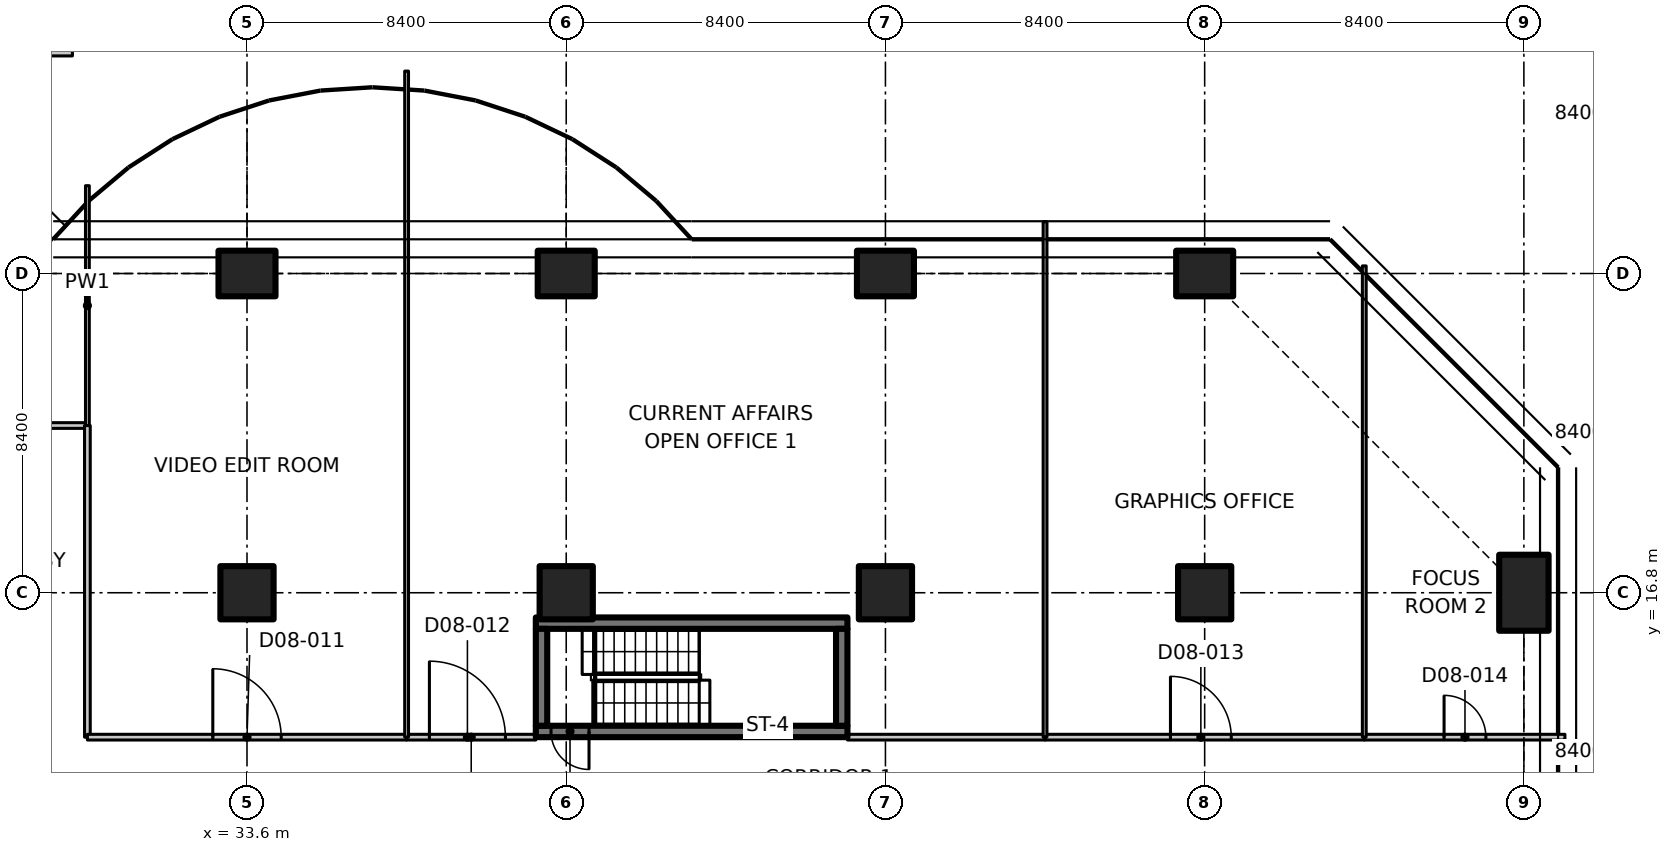
"""IFC4 building model, lengths in metres.
Left out: names, types, materials, properties, quantities, classifications, styles, units other than length and angle.
Written with IfcOpenShell. Run it as: python <this file> out.ifc"""

import sys

from ifc_helpers import new_model, si_unit, direction, frame, frame_2d, origin, origin_2d, place, context, subcontext, project, spatial, polyline, rectangle, outline, extrude, element, fill, save


model = new_model("IFC4")
c1 = context("Model", 3, precision=1e-05, world=origin(), true_north=direction((0.0, 1.0)))
c2 = subcontext(c1, "Body", "Model", "MODEL_VIEW")
j1 = project(units=[si_unit("LENGTHUNIT", "METRE"), si_unit("PLANEANGLEUNIT", "RADIAN")], contexts=[c1])
p1 = place(None, origin())
s1 = spatial("IfcSite", under=j1, at=p1, CompositionType="ELEMENT")
p2 = place(p1, origin())
s2 = spatial("IfcBuilding", under=s1, at=p2, CompositionType="ELEMENT")
p3 = place(p2, frame((0.0, 0.0, 54.5)))
s3 = spatial("IfcBuildingStorey", under=s2, at=p3, CompositionType="ELEMENT", Elevation=54.5)
p4 = place(p3, frame((33.6, 16.8, 0.0), z_axis=(0.0, 0.0, 1.0), x_axis=(1.0, 0.0, 0.0)))
e1 = element("IfcColumn", 1, at=p4, inside=s3, PredefinedType="COLUMN", context=c2, shape_type="SweptSolid", body=[
    extrude(rectangle(XDim=1.4, YDim=1.4, at=origin_2d()), origin(), (0.0, 0.0, 1.0), 3.35),
])
p5 = place(p3, frame((33.6, 25.2, 0.0), z_axis=(0.0, 0.0, 1.0), x_axis=(0.0, 1.0, 0.0)))
e2 = element("IfcColumn", 2, at=p5, inside=s3, PredefinedType="COLUMN", context=c2, shape_type="SweptSolid", body=[
    extrude(rectangle(XDim=1.2, YDim=1.5, at=origin_2d()), origin(), (0.0, 0.0, 1.0), 3.35),
])
p6 = place(p3, frame((42.0, 16.8, 0.0), z_axis=(0.0, 0.0, 1.0), x_axis=(1.0, 0.0, 0.0)))
e3 = element("IfcColumn", 3, at=p6, inside=s3, PredefinedType="COLUMN", context=c2, shape_type="SweptSolid", body=[
    extrude(rectangle(XDim=1.4, YDim=1.4, at=origin_2d()), origin(), (0.0, 0.0, 1.0), 3.35),
])
p7 = place(p3, frame((42.0, 25.2, 0.0), z_axis=(0.0, 0.0, 1.0), x_axis=(0.0, 1.0, 0.0)))
e4 = element("IfcColumn", 4, at=p7, inside=s3, PredefinedType="COLUMN", context=c2, shape_type="SweptSolid", body=[
    extrude(rectangle(XDim=1.2, YDim=1.5, at=origin_2d()), origin(), (0.0, 0.0, 1.0), 3.35),
])
p8 = place(p3, frame((50.4, 16.8, 0.0), z_axis=(0.0, 0.0, 1.0), x_axis=(1.0, 0.0, 0.0)))
e5 = element("IfcColumn", 5, at=p8, inside=s3, PredefinedType="COLUMN", context=c2, shape_type="SweptSolid", body=[
    extrude(rectangle(XDim=1.4, YDim=1.4, at=origin_2d()), origin(), (0.0, 0.0, 1.0), 3.35),
])
p9 = place(p3, frame((50.4, 25.2, 0.0), z_axis=(0.0, 0.0, 1.0), x_axis=(0.0, 1.0, 0.0)))
e6 = element("IfcColumn", 6, at=p9, inside=s3, PredefinedType="COLUMN", context=c2, shape_type="SweptSolid", body=[
    extrude(rectangle(XDim=1.2, YDim=1.5, at=origin_2d()), origin(), (0.0, 0.0, 1.0), 3.35),
])
p10 = place(p3, frame((58.8, 16.8, 0.0), z_axis=(0.0, 0.0, 1.0), x_axis=(1.0, 0.0, 0.0)))
e7 = element("IfcColumn", 7, at=p10, inside=s3, PredefinedType="COLUMN", context=c2, shape_type="SweptSolid", body=[
    extrude(rectangle(XDim=1.4, YDim=1.4, at=origin_2d()), origin(), (0.0, 0.0, 1.0), 3.35),
])
p11 = place(p3, frame((58.8, 25.2, 0.0), z_axis=(0.0, 0.0, 1.0), x_axis=(0.0, 1.0, 0.0)))
e8 = element("IfcColumn", 8, at=p11, inside=s3, PredefinedType="COLUMN", context=c2, shape_type="SweptSolid", body=[
    extrude(rectangle(XDim=1.2, YDim=1.5, at=origin_2d()), origin(), (0.0, 0.0, 1.0), 3.35),
])
p12 = place(p3, frame((67.2, 16.8, 0.0), z_axis=(0.0, 0.0, 1.0), x_axis=(1.0, 0.0, 0.0)))
e9 = element("IfcColumn", 9, at=p12, inside=s3, PredefinedType="COLUMN", context=c2, shape_type="SweptSolid", body=[
    extrude(rectangle(XDim=1.3, YDim=2.0, at=origin_2d()), origin(), (0.0, 0.0, 1.0), 3.35),
])
p13 = place(p3, frame((49.4, 13.15, 0.0), z_axis=(0.0, 0.0, 1.0), x_axis=(-1.0, 0.0, 0.0)))
e10 = element("IfcWall", 10, at=p13, inside=s3, PredefinedType="SHEAR", context=c2, shape_type="SweptSolid", body=[
    extrude(rectangle(XDim=8.2, YDim=0.3, at=frame_2d((4.1, 0.0))), origin(), (0.0, 0.0, 1.0), 3.35),
])
p14 = place(p13, frame((6.8, 0.0, 0.0)))
e11 = element("IfcOpeningElement", 11, at=p14, cuts=e10, PredefinedType="OPENING", context=c2, shape_type="SweptSolid", body=[
    extrude(rectangle(XDim=1.0, YDim=2.1, at=frame_2d((0.5, 1.05))), frame((0.0, 0.16, 0.0), z_axis=(0.0, -1.0, 0.0), x_axis=(1.0, 0.0, 0.0)), (0.0, 0.0, 1.0), 0.32),
])
p15 = place(p3, frame((41.2, 16.0, 0.0), z_axis=(0.0, 0.0, 1.0), x_axis=(1.0, 0.0, 0.0)))
e12 = element("IfcWall", 12, at=p15, inside=s3, PredefinedType="SHEAR", context=c2, shape_type="SweptSolid", body=[
    extrude(rectangle(XDim=8.2, YDim=0.3, at=frame_2d((4.1, 0.0))), origin(), (0.0, 0.0, 1.0), 3.35),
])
for number, where, z_axis, x_axis in (
    (13, (41.35, 13.3, 0.0), (0.0, 0.0, 1.0), (0.0, 1.0, 0.0)),
    (14, (49.25, 13.3, 0.0), (0.0, 0.0, 1.0), (0.0, 1.0, 0.0)),
):
    element("IfcWall", number, at=place(p3, frame(where, z_axis=z_axis, x_axis=x_axis)), inside=s3, PredefinedType="SHEAR", context=c2, shape_type="SweptSolid", body=[
        extrude(rectangle(XDim=2.55, YDim=0.3, at=frame_2d((1.275, 0.0))), origin(), (0.0, 0.0, 1.0), 3.35),
    ])
p16 = place(p3, frame((25.2, 21.2, 0.0), z_axis=(0.0, 0.0, 1.0), x_axis=(1.0, 0.0, 0.0)))
e15 = element("IfcWall", 15, at=p16, inside=s3, PredefinedType="PARTITIONING", context=c2, shape_type="SweptSolid", body=[
    extrude(rectangle(XDim=4.2, YDim=0.15, at=frame_2d((2.1, 0.0))), origin(), (0.0, 0.0, 1.0), 3.33),
])
p17 = place(p3, frame((29.4, 21.2, 0.0), z_axis=(0.0, 0.0, 1.0), x_axis=(0.0, -1.0, 0.0)))
e16 = element("IfcWall", 16, at=p17, inside=s3, PredefinedType="PARTITIONING", context=c2, shape_type="SweptSolid", body=[
    extrude(rectangle(XDim=8.2, YDim=0.15, at=frame_2d((4.1, 0.0))), origin(), (0.0, 0.0, 1.0), 3.33),
])
p18 = place(p3, frame((29.4, 27.511, 0.0), z_axis=(0.0, 0.0, 1.0), x_axis=(0.0, -1.0, 0.0)))
e17 = element("IfcWall", 17, at=p18, inside=s3, PredefinedType="PARTITIONING", context=c2, shape_type="SweptSolid", body=[
    extrude(outline(polyline([(0.0, 0.0), (6.311, 0.0), (6.311, 3.33), (2.761, 3.33), (2.759, 2.98), (1.863, 2.98), (1.861, 3.33), (0.236, 3.33), (0.0, 3.33), (0.0, 0.0)])), frame((0.0, 0.05, 0.0), z_axis=(0.0, -1.0, 0.0), x_axis=(1.0, 0.0, 0.0)), (0.0, 0.0, 1.0), 0.1),
])
p19 = place(p3, frame((25.2, 31.0, 0.0), z_axis=(0.0, 0.0, 1.0), x_axis=(1.0, 0.0, 0.0)))
e18 = element("IfcWall", 18, at=p19, inside=s3, PredefinedType="PARTITIONING", context=c2, shape_type="SweptSolid", body=[
    extrude(rectangle(XDim=3.806, YDim=0.15, at=frame_2d((1.903, 0.0))), origin(), (0.0, 0.0, 1.0), 2.98),
])
p20 = place(p3, frame((29.4, 13.0, 0.0), z_axis=(0.0, 0.0, 1.0), x_axis=(1.0, 0.0, 0.0)))
e19 = element("IfcWall", 19, at=p20, inside=s3, PredefinedType="PARTITIONING", context=c2, shape_type="SweptSolid", body=[
    extrude(rectangle(XDim=8.4, YDim=0.15, at=frame_2d((4.2, 0.0))), origin(), (0.0, 0.0, 1.0), 3.33),
])
p21 = place(p20, frame((3.3, 0.0, 0.0)))
e20 = element("IfcOpeningElement", 20, at=p21, cuts=e19, PredefinedType="OPENING", context=c2, shape_type="SweptSolid", body=[
    extrude(rectangle(XDim=1.8, YDim=2.1, at=frame_2d((0.9, 1.05))), frame((0.0, 0.085, 0.0), z_axis=(0.0, -1.0, 0.0), x_axis=(1.0, 0.0, 0.0)), (0.0, 0.0, 1.0), 0.17),
])
p22 = place(p3, frame((37.8, 13.0, 0.0), z_axis=(0.0, 0.0, 1.0), x_axis=(1.0, 0.0, 0.0)))
e21 = element("IfcWall", 21, at=p22, inside=s3, PredefinedType="PARTITIONING", context=c2, shape_type="SweptSolid", body=[
    extrude(rectangle(XDim=3.4, YDim=0.15, at=frame_2d((1.7, 0.0))), origin(), (0.0, 0.0, 1.0), 3.33),
])
p23 = place(p22, frame((0.6, 0.0, 0.0)))
e22 = element("IfcOpeningElement", 22, at=p23, cuts=e21, PredefinedType="OPENING", context=c2, shape_type="SweptSolid", body=[
    extrude(rectangle(XDim=2.0, YDim=2.4, at=frame_2d((1.0, 1.2))), frame((0.0, 0.085, 0.0), z_axis=(0.0, -1.0, 0.0), x_axis=(1.0, 0.0, 0.0)), (0.0, 0.0, 1.0), 0.17),
])
p24 = place(p3, frame((49.4, 13.0, 0.0), z_axis=(0.0, 0.0, 1.0), x_axis=(1.0, 0.0, 0.0)))
e23 = element("IfcWall", 23, at=p24, inside=s3, PredefinedType="PARTITIONING", context=c2, shape_type="SweptSolid", body=[
    extrude(rectangle(XDim=5.2, YDim=0.15, at=frame_2d((2.6, 0.0))), origin(), (0.0, 0.0, 1.0), 3.33),
])
p25 = place(p3, frame((54.6, 13.0, 0.0), z_axis=(0.0, 0.0, 1.0), x_axis=(1.0, 0.0, 0.0)))
e24 = element("IfcWall", 24, at=p25, inside=s3, PredefinedType="PARTITIONING", context=c2, shape_type="SweptSolid", body=[
    extrude(rectangle(XDim=8.4, YDim=0.15, at=frame_2d((4.2, 0.0))), origin(), (0.0, 0.0, 1.0), 3.33),
])
p26 = place(p25, frame((3.3, 0.0, 0.0)))
e25 = element("IfcOpeningElement", 25, at=p26, cuts=e24, PredefinedType="OPENING", context=c2, shape_type="SweptSolid", body=[
    extrude(rectangle(XDim=1.6, YDim=2.1, at=frame_2d((0.8, 1.05))), frame((0.0, 0.085, 0.0), z_axis=(0.0, -1.0, 0.0), x_axis=(1.0, 0.0, 0.0)), (0.0, 0.0, 1.0), 0.17),
])
p27 = place(p3, frame((63.0, 13.0, 0.0), z_axis=(0.0, 0.0, 1.0), x_axis=(1.0, 0.0, 0.0)))
e26 = element("IfcWall", 26, at=p27, inside=s3, PredefinedType="PARTITIONING", context=c2, shape_type="SweptSolid", body=[
    extrude(outline(polyline([(0.0, 0.0), (5.28, 0.0), (5.28, 3.33), (4.65, 3.33), (4.648, 2.98), (3.752, 2.98), (3.75, 3.33), (0.0, 3.33), (0.0, 0.0)])), frame((0.0, 0.075, 0.0), z_axis=(0.0, -1.0, 0.0), x_axis=(1.0, 0.0, 0.0)), (0.0, 0.0, 1.0), 0.15),
])
p28 = place(p27, frame((2.1, 0.0, 0.0)))
e27 = element("IfcOpeningElement", 27, at=p28, cuts=e26, PredefinedType="OPENING", context=c2, shape_type="SweptSolid", body=[
    extrude(rectangle(XDim=1.1, YDim=2.1, at=frame_2d((0.55, 1.05))), frame((0.0, 0.085, 0.0), z_axis=(0.0, -1.0, 0.0), x_axis=(1.0, 0.0, 0.0)), (0.0, 0.0, 1.0), 0.17),
])
p29 = place(p3, frame((37.8, 30.526, 0.0), z_axis=(0.0, 0.0, 1.0), x_axis=(0.0, -1.0, 0.0)))
e28 = element("IfcWall", 28, at=p29, inside=s3, PredefinedType="PARTITIONING", context=c2, shape_type="SweptSolid", body=[
    extrude(outline(polyline([(0.0, 0.0), (17.526, 0.0), (17.526, 3.33), (5.776, 3.33), (5.774, 2.98), (4.878, 2.98), (4.876, 3.33), (0.283, 3.33), (0.0, 3.33), (0.0, 0.0)])), frame((0.0, 0.05, 0.0), z_axis=(0.0, -1.0, 0.0), x_axis=(1.0, 0.0, 0.0)), (0.0, 0.0, 1.0), 0.1),
])
p30 = place(p3, frame((54.6, 26.565, 0.0), z_axis=(0.0, 0.0, 1.0), x_axis=(0.0, -1.0, 0.0)))
e29 = element("IfcWall", 29, at=p30, inside=s3, PredefinedType="PARTITIONING", context=c2, shape_type="SweptSolid", body=[
    extrude(outline(polyline([(0.0, 0.0), (13.565, 0.0), (13.565, 3.33), (1.815, 3.33), (1.813, 2.98), (0.917, 2.98), (0.915, 3.33), (0.265, 3.33), (0.0, 3.33), (0.0, 0.0)])), frame((0.0, 0.05, 0.0), z_axis=(0.0, -1.0, 0.0), x_axis=(1.0, 0.0, 0.0)), (0.0, 0.0, 1.0), 0.1),
])
p31 = place(p3, frame((63.0, 25.4, 0.0), z_axis=(0.0, 0.0, 1.0), x_axis=(0.0, -1.0, 0.0)))
e30 = element("IfcWall", 30, at=p31, inside=s3, PredefinedType="PARTITIONING", context=c2, shape_type="SweptSolid", body=[
    extrude(outline(polyline([(0.0, 0.0), (12.4, 0.0), (12.4, 3.33), (5.066, 3.33), (5.064, 2.98), (3.736, 2.98), (3.734, 3.33), (0.0, 3.33), (0.0, 0.0)])), frame((0.0, 0.05, 0.0), z_axis=(0.0, -1.0, 0.0), x_axis=(1.0, 0.0, 0.0)), (0.0, 0.0, 1.0), 0.1),
])
p32 = place(p14, origin())
e31 = element("IfcDoor", 31, at=p32, inside=s3, OperationType="SINGLE_SWING_RIGHT", PredefinedType="DOOR", context=c2, shape_type="SweptSolid", body=[
    extrude(rectangle(XDim=1.0, YDim=2.1, at=frame_2d((0.5, 1.05))), frame((0.0, 0.025, 0.0), z_axis=(0.0, -1.0, 0.0), x_axis=(1.0, 0.0, 0.0)), (0.0, 0.0, 1.0), 0.05),
])
fill(e11, e31)
p33 = place(p21, origin())
e32 = element("IfcDoor", 32, at=p33, inside=s3, OperationType="DOUBLE_DOOR_SINGLE_SWING", PredefinedType="DOOR", context=c2, shape_type="SweptSolid", body=[
    extrude(rectangle(XDim=1.8, YDim=2.1, at=frame_2d((0.9, 1.05))), frame((0.0, 0.025, 0.0), z_axis=(0.0, -1.0, 0.0), x_axis=(1.0, 0.0, 0.0)), (0.0, 0.0, 1.0), 0.05),
])
fill(e20, e32)
p34 = place(p23, origin())
e33 = element("IfcDoor", 33, at=p34, inside=s3, OperationType="DOUBLE_DOOR_SINGLE_SWING", PredefinedType="DOOR", context=c2, shape_type="SweptSolid", body=[
    extrude(rectangle(XDim=2.0, YDim=2.4, at=frame_2d((1.0, 1.2))), frame((0.0, 0.025, 0.0), z_axis=(0.0, -1.0, 0.0), x_axis=(1.0, 0.0, 0.0)), (0.0, 0.0, 1.0), 0.05),
])
fill(e22, e33)
p35 = place(p26, origin())
e34 = element("IfcDoor", 34, at=p35, inside=s3, OperationType="DOUBLE_DOOR_SINGLE_SWING", PredefinedType="DOOR", context=c2, shape_type="SweptSolid", body=[
    extrude(rectangle(XDim=1.6, YDim=2.1, at=frame_2d((0.8, 1.05))), frame((0.0, 0.025, 0.0), z_axis=(0.0, -1.0, 0.0), x_axis=(1.0, 0.0, 0.0)), (0.0, 0.0, 1.0), 0.05),
])
fill(e25, e34)
p36 = place(p28, origin())
e35 = element("IfcDoor", 35, at=p36, inside=s3, OperationType="SINGLE_SWING_LEFT", PredefinedType="DOOR", context=c2, shape_type="SweptSolid", body=[
    extrude(rectangle(XDim=1.1, YDim=2.1, at=frame_2d((0.55, 1.05))), frame((0.0, 0.025, 0.0), z_axis=(0.0, -1.0, 0.0), x_axis=(1.0, 0.0, 0.0)), (0.0, 0.0, 1.0), 0.05),
])
fill(e27, e35)
save(model, sys.argv[1])
